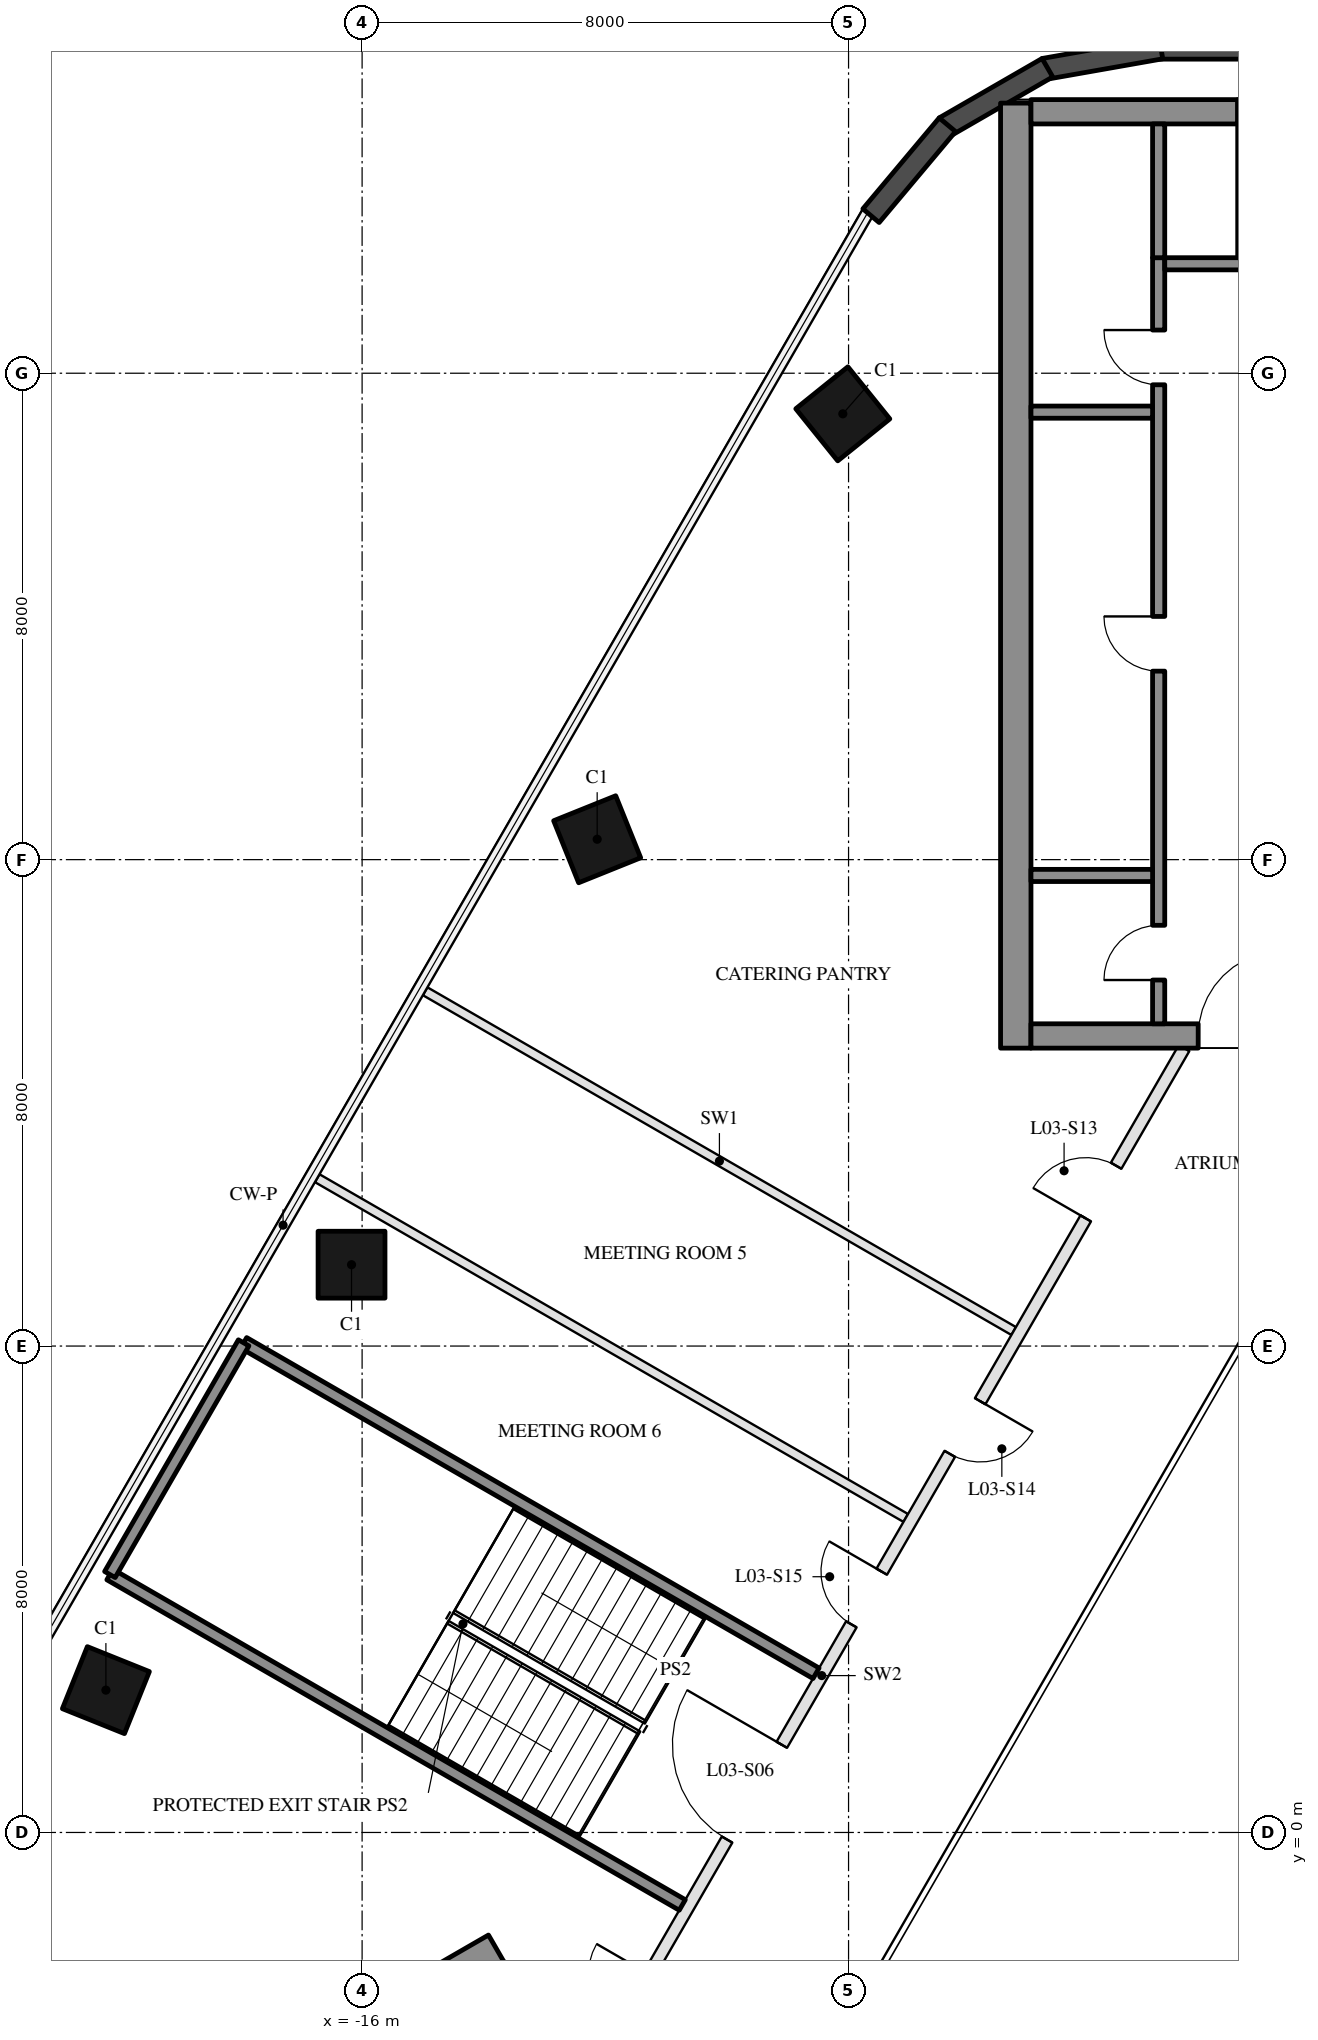
"""IFC4 building model, lengths in metres.
Left out: names, types, materials, properties, quantities, classifications, styles, units other than length and angle.
Written with IfcOpenShell. Run it as: python <this file> out.ifc"""

import sys

from ifc_helpers import new_model, si_unit, direction, frame, frame_2d, origin, origin_2d, place, context, subcontext, project, spatial, rectangle, hollow_rectangle, extrude, boolean, halfspace, element, fill, save


model = new_model("IFC4")
c1 = context("Model", 3, precision=1e-05, world=origin(), true_north=direction((0.0, 1.0)))
c2 = subcontext(c1, "Body", "Model", "MODEL_VIEW")
j1 = project(units=[si_unit("LENGTHUNIT", "METRE"), si_unit("PLANEANGLEUNIT", "RADIAN")], contexts=[c1])
p1 = place(None, origin())
s1 = spatial("IfcSite", under=j1, at=p1, CompositionType="ELEMENT")
p2 = place(p1, origin())
s2 = spatial("IfcBuilding", under=s1, at=p2, CompositionType="ELEMENT")
p3 = place(p2, frame((0.0, 0.0, 23.5)))
s3 = spatial("IfcBuildingStorey", under=s2, at=p3, CompositionType="ELEMENT", Elevation=23.5)
p4 = place(p3, frame((-8.094, 23.332, 0.0), z_axis=(0.024212996995, -0.062505583791, 0.997750862075), x_axis=(0.500357699692, 0.864797842793, 0.042034074978)))
e1 = element("IfcColumn", 1, at=p4, inside=s3, PredefinedType="COLUMN", context=c2, shape_type="SweptSolid", body=[
    boolean("DIFFERENCE", boolean("DIFFERENCE", extrude(hollow_rectangle(XDim=1.1, YDim=1.1, WallThickness=0.05, at=origin_2d()), origin(), (0.0, 0.0, 1.0), 5.011), halfspace(frame((0.0, 0.0, 0.017), z_axis=(0.0, 0.0, 1.0), x_axis=(1.0, 0.0, 0.0)), True)), halfspace(frame((0.0, 0.0, 4.999), z_axis=(0.0, 0.0, 1.0), x_axis=(1.0, 0.0, 0.0)), False)),
])
p5 = place(p3, frame((-12.134, 16.335, 0.0), z_axis=(0.034759119107, -0.04436297109, 0.998410602125), x_axis=(0.500316360293, 0.865586931558, 0.021042897599)))
e2 = element("IfcColumn", 2, at=p5, inside=s3, PredefinedType="COLUMN", context=c2, shape_type="SweptSolid", body=[
    boolean("DIFFERENCE", boolean("DIFFERENCE", extrude(hollow_rectangle(XDim=1.1, YDim=1.1, WallThickness=0.05, at=origin_2d()), origin(), (0.0, 0.0, 1.0), 5.008), halfspace(frame((0.0, 0.0, 0.014), z_axis=(0.0, 0.0, 1.0), x_axis=(1.0, 0.0, 0.0)), True)), halfspace(frame((0.0, 0.0, 4.997), z_axis=(0.0, 0.0, 1.0), x_axis=(1.0, 0.0, 0.0)), False)),
])
p6 = place(p3, frame((-16.174, 9.338, 0.0), z_axis=(0.045250647617, -0.026087388443, 0.99863498189), x_axis=(-0.499528531793, -0.866297435009, 4.558094e-06)))
e3 = element("IfcColumn", 3, at=p6, inside=s3, PredefinedType="COLUMN", context=c2, shape_type="SweptSolid", body=[
    boolean("DIFFERENCE", boolean("DIFFERENCE", extrude(hollow_rectangle(XDim=1.1, YDim=1.1, WallThickness=0.05, at=origin_2d()), origin(), (0.0, 0.0, 1.0), 5.007), halfspace(frame((0.0, 0.0, 0.013), z_axis=(0.0, 0.0, 1.0), x_axis=(1.0, 0.0, 0.0)), True)), halfspace(frame((0.0, 0.0, 4.996), z_axis=(0.0, 0.0, 1.0), x_axis=(1.0, 0.0, 0.0)), False)),
])
p7 = place(p3, frame((-20.214, 2.341, 0.0), z_axis=(0.055770669369, -0.007946345373, 0.998411983118), x_axis=(-0.499656252381, -0.865968742186, 0.021018254285)))
e4 = element("IfcColumn", 4, at=p7, inside=s3, PredefinedType="COLUMN", context=c2, shape_type="SweptSolid", body=[
    boolean("DIFFERENCE", boolean("DIFFERENCE", extrude(hollow_rectangle(XDim=1.1, YDim=1.1, WallThickness=0.05, at=origin_2d()), origin(), (0.0, 0.0, 1.0), 5.008), halfspace(frame((0.0, 0.0, 0.014), z_axis=(0.0, 0.0, 1.0), x_axis=(1.0, 0.0, 0.0)), True)), halfspace(frame((0.0, 0.0, 4.997), z_axis=(0.0, 0.0, 1.0), x_axis=(1.0, 0.0, 0.0)), False)),
])
p8 = place(p3, frame((0.0, 27.2, 0.0), z_axis=(0.0, 0.0, 1.0), x_axis=(1.0, 0.0, 0.0)))
e5 = element("IfcColumn", 5, at=p8, inside=s3, PredefinedType="COLUMN", context=c2, shape_type="SweptSolid", body=[
    extrude(hollow_rectangle(XDim=3.2, YDim=2.6, WallThickness=0.08, at=origin_2d()), origin(), (0.0, 0.0, 1.0), 5.0),
])
p9 = place(p3, frame((2.893, 29.341, 0.0), z_axis=(0.0, 0.0, 1.0), x_axis=(-1.0, 0.0, 0.0)))
e6 = element("IfcWall", 6, at=p9, inside=s3, PredefinedType="SOLIDWALL", context=c2, shape_type="SweptSolid", body=[
    extrude(rectangle(XDim=5.787, YDim=0.35, at=frame_2d((2.893, 0.0))), origin(), (0.0, 0.0, 1.0), 4.7),
])
p10 = place(p3, frame((-2.863, 29.344, 0.0), z_axis=(0.0, 0.0, 1.0), x_axis=(-0.98479990812, -0.173692662389, 0.0)))
e7 = element("IfcWall", 7, at=p10, inside=s3, PredefinedType="SOLIDWALL", context=c2, shape_type="SweptSolid", body=[
    extrude(rectangle(XDim=1.954, YDim=0.35, at=frame_2d((0.977, 0.0))), origin(), (0.0, 0.0, 1.0), 4.7),
])
p11 = place(p3, frame((-4.729, 29.025, 0.0), z_axis=(0.0, 0.0, 1.0), x_axis=(-0.866027425724, -0.499996497882, 0.0)))
e8 = element("IfcWall", 8, at=p11, inside=s3, PredefinedType="SOLIDWALL", context=c2, shape_type="SweptSolid", body=[
    extrude(rectangle(XDim=1.954, YDim=0.35, at=frame_2d((0.977, 0.0))), origin(), (0.0, 0.0, 1.0), 4.7),
])
p12 = place(p3, frame((-6.375, 28.087, 0.0), z_axis=(0.0, 0.0, 1.0), x_axis=(-0.642799224464, -0.766034697013, 0.0)))
e9 = element("IfcWall", 9, at=p12, inside=s3, PredefinedType="SOLIDWALL", context=c2, shape_type="SweptSolid", body=[
    extrude(rectangle(XDim=1.953, YDim=0.35, at=frame_2d((0.977, 0.0))), origin(), (0.0, 0.0, 1.0), 4.7),
])
p13 = place(p3, frame((-5.25, 12.9, 0.0), z_axis=(0.0, 0.0, 1.0), x_axis=(0.0, 1.0, 0.0)))
e10 = element("IfcWall", 10, at=p13, inside=s3, PredefinedType="SHEAR", context=c2, shape_type="SweptSolid", body=[
    extrude(rectangle(XDim=15.542, YDim=0.5, at=frame_2d((7.771, 0.0))), origin(), (0.0, 0.0, 1.0), 4.7),
])
p14 = place(p3, frame((5.0, 13.1, 0.0), z_axis=(0.0, 0.0, 1.0), x_axis=(-1.0, 0.0, 0.0)))
e11 = element("IfcWall", 11, at=p14, inside=s3, PredefinedType="SHEAR", context=c2, shape_type="SweptSolid", body=[
    extrude(rectangle(XDim=10.0, YDim=0.4, at=frame_2d((5.0, 0.0))), origin(), (0.0, 0.0, 1.0), 4.7),
])
p15 = place(p14, frame((3.55, 0.0, 0.0)))
e12 = element("IfcOpeningElement", 12, at=p15, cuts=e11, PredefinedType="OPENING", context=c2, shape_type="SweptSolid", body=[
    extrude(rectangle(XDim=1.1, YDim=2.1, at=frame_2d((0.55, 1.05))), frame((0.0, 0.21, 0.0), z_axis=(0.0, -1.0, 0.0), x_axis=(1.0, 0.0, 0.0)), (0.0, 0.0, 1.0), 0.42),
])
p16 = place(p14, frame((5.85, 0.0, 0.0)))
e13 = element("IfcOpeningElement", 13, at=p16, cuts=e11, PredefinedType="OPENING", context=c2, shape_type="SweptSolid", body=[
    extrude(rectangle(XDim=1.4, YDim=2.1, at=frame_2d((0.7, 1.05))), frame((0.0, 0.21, 0.0), z_axis=(0.0, -1.0, 0.0), x_axis=(1.0, 0.0, 0.0)), (0.0, 0.0, 1.0), 0.42),
])
p17 = place(p3, frame((-1.6, 28.3, 0.0), z_axis=(0.0, 0.0, 1.0), x_axis=(-1.0, 0.0, 0.0)))
e14 = element("IfcWall", 14, at=p17, inside=s3, PredefinedType="SHEAR", context=c2, shape_type="SweptSolid", body=[
    extrude(rectangle(XDim=3.4, YDim=0.4, at=frame_2d((1.7, 0.0))), origin(), (0.0, 0.0, 1.0), 4.7),
])
p18 = place(p3, frame((-2.9, 13.3, 0.0), z_axis=(0.0, 0.0, 1.0), x_axis=(0.0, 1.0, 0.0)))
e15 = element("IfcWall", 15, at=p18, inside=s3, PredefinedType="SHEAR", context=c2, shape_type="SweptSolid", body=[
    extrude(rectangle(XDim=12.6, YDim=0.2, at=frame_2d((6.3, 0.0))), origin(), (0.0, 0.0, 1.0), 4.7),
])
p19 = place(p18, frame((0.72, 0.0, 0.0)))
e16 = element("IfcOpeningElement", 16, at=p19, cuts=e15, PredefinedType="OPENING", context=c2, shape_type="SweptSolid", body=[
    extrude(rectangle(XDim=0.9, YDim=2.1, at=frame_2d((0.45, 1.05))), frame((0.0, 0.11, 0.0), z_axis=(0.0, -1.0, 0.0), x_axis=(1.0, 0.0, 0.0)), (0.0, 0.0, 1.0), 0.22),
])
p20 = place(p18, frame((5.8, 0.0, 0.0)))
e17 = element("IfcOpeningElement", 17, at=p20, cuts=e15, PredefinedType="OPENING", context=c2, shape_type="SweptSolid", body=[
    extrude(rectangle(XDim=0.9, YDim=2.1, at=frame_2d((0.45, 1.05))), frame((0.0, 0.11, 0.0), z_axis=(0.0, -1.0, 0.0), x_axis=(1.0, 0.0, 0.0)), (0.0, 0.0, 1.0), 0.22),
])
p21 = place(p18, frame((10.51, 0.0, 0.0)))
e18 = element("IfcOpeningElement", 18, at=p21, cuts=e15, PredefinedType="OPENING", context=c2, shape_type="SweptSolid", body=[
    extrude(rectangle(XDim=0.9, YDim=2.1, at=frame_2d((0.45, 1.05))), frame((0.0, 0.11, 0.0), z_axis=(0.0, -1.0, 0.0), x_axis=(1.0, 0.0, 0.0)), (0.0, 0.0, 1.0), 0.22),
])
p22 = place(p3, frame((-0.4, 25.8, 0.0), z_axis=(0.0, 0.0, 1.0), x_axis=(-1.0, 0.0, 0.0)))
e19 = element("IfcWall", 19, at=p22, inside=s3, PredefinedType="SHEAR", context=c2, shape_type="SweptSolid", body=[
    extrude(rectangle(XDim=2.4, YDim=0.2, at=frame_2d((1.2, 0.0))), origin(), (0.0, 0.0, 1.0), 4.7),
])
for number, where, z_axis, x_axis in (
    (20, (-3.0, 15.74, 0.0), (0.0, 0.0, 1.0), (-1.0, 0.0, 0.0)),
    (21, (-3.0, 23.36, 0.0), (0.0, 0.0, 1.0), (-1.0, 0.0, 0.0)),
):
    element("IfcWall", number, at=place(p3, frame(where, z_axis=z_axis, x_axis=x_axis)), inside=s3, PredefinedType="SHEAR", context=c2, shape_type="SweptSolid", body=[
        extrude(rectangle(XDim=2.0, YDim=0.2, at=frame_2d((1.0, 0.0))), origin(), (0.0, 0.0, 1.0), 4.7),
    ])
p23 = place(p3, frame((-2.9, 25.9, 0.0), z_axis=(0.0, 0.0, 1.0), x_axis=(0.0, 1.0, 0.0)))
e22 = element("IfcWall", 22, at=p23, inside=s3, PredefinedType="SHEAR", context=c2, shape_type="SweptSolid", body=[
    extrude(rectangle(XDim=2.2, YDim=0.2, at=frame_2d((1.1, 0.0))), origin(), (0.0, 0.0, 1.0), 4.7),
])
p24 = place(p3, frame((-13.797, -1.903, 0.0), z_axis=(0.0, 0.0, 1.0), x_axis=(-0.866025760136, -0.499999382781, 0.0)))
e23 = element("IfcWall", 23, at=p24, inside=s3, PredefinedType="SHEAR", context=c2, shape_type="SweptSolid", body=[
    extrude(rectangle(XDim=15.542, YDim=0.5, at=frame_2d((7.771, 0.0))), origin(), (0.0, 0.0, 1.0), 4.7),
])
for number, where, z_axis, x_axis in (
    (24, (-14.963, 13.835, 0.0), (0.0, 0.0, 1.0), (0.866, -0.5, 0.0)),
    (25, (-16.738, 10.761, 0.0), (0.0, 0.0, 1.0), (0.866, -0.5, 0.0)),
):
    element("IfcWall", number, at=place(p3, frame(where, z_axis=z_axis, x_axis=x_axis)), inside=s3, PredefinedType="PARTITIONING", context=c2, shape_type="SweptSolid", body=[
        extrude(rectangle(XDim=11.176, YDim=0.15, at=frame_2d((5.588, 0.0))), origin(), (0.0, 0.0, 1.0), 4.1),
    ])
p25 = place(p3, frame((-17.948, 8.053, 0.0), z_axis=(0.0, 0.0, 1.0), x_axis=(0.86602026553, -0.500008899612, 0.0)))
e26 = element("IfcWall", 26, at=p25, inside=s3, PredefinedType="SOLIDWALL", context=c2, shape_type="SweptSolid", body=[
    extrude(rectangle(XDim=10.87, YDim=0.2, at=frame_2d((5.435, 0.0))), origin(), (0.0, 0.0, 1.0), 4.7),
])
p26 = place(p3, frame((-20.148, 4.242, 0.0), z_axis=(0.0, 0.0, 1.0), x_axis=(0.866025880615, -0.499999174104, 0.0)))
e27 = element("IfcWall", 27, at=p26, inside=s3, PredefinedType="SOLIDWALL", context=c2, shape_type="SweptSolid", body=[
    extrude(rectangle(XDim=10.87, YDim=0.2, at=frame_2d((5.435, 0.0))), origin(), (0.0, 0.0, 1.0), 4.7),
])
p27 = place(p3, frame((-2.482, 12.9, 0.0), z_axis=(0.0, 0.0, 1.0), x_axis=(-0.50000478328, -0.866022642139, 0.0)))
e28 = element("IfcWall", 28, at=p27, inside=s3, PredefinedType="PARTITIONING", context=c2, shape_type="SweptSolid", body=[
    extrude(rectangle(XDim=19.861, YDim=0.2, at=frame_2d((9.931, 0.0))), origin(), (0.0, 0.0, 1.0), 3.91),
])
p28 = place(p27, frame((13.23, 0.0, 0.0)))
e29 = element("IfcOpeningElement", 29, at=p28, cuts=e28, PredefinedType="OPENING", context=c2, shape_type="SweptSolid", body=[
    extrude(rectangle(XDim=1.8, YDim=2.1, at=frame_2d((0.9, 1.05))), frame((0.0, 0.11, 0.0), z_axis=(0.0, -1.0, 0.0), x_axis=(1.0, 0.0, 0.0)), (0.0, 0.0, 1.0), 0.22),
])
p29 = place(p27, frame((2.234, 0.0, 0.0)))
e30 = element("IfcOpeningElement", 30, at=p29, cuts=e28, PredefinedType="OPENING", context=c2, shape_type="SweptSolid", body=[
    extrude(rectangle(XDim=1.0, YDim=2.1, at=frame_2d((0.5, 1.05))), frame((0.0, 0.11, 0.0), z_axis=(0.0, -1.0, 0.0), x_axis=(1.0, 0.0, 0.0)), (0.0, 0.0, 1.0), 0.22),
])
p30 = place(p27, frame((6.706, 0.0, 0.0)))
e31 = element("IfcOpeningElement", 31, at=p30, cuts=e28, PredefinedType="OPENING", context=c2, shape_type="SweptSolid", body=[
    extrude(rectangle(XDim=1.0, YDim=2.1, at=frame_2d((0.5, 1.05))), frame((0.0, 0.11, 0.0), z_axis=(0.0, -1.0, 0.0), x_axis=(1.0, 0.0, 0.0)), (0.0, 0.0, 1.0), 0.22),
])
p31 = place(p27, frame((9.943, 0.0, 0.0)))
e32 = element("IfcOpeningElement", 32, at=p31, cuts=e28, PredefinedType="OPENING", context=c2, shape_type="SweptSolid", body=[
    extrude(rectangle(XDim=1.0, YDim=2.1, at=frame_2d((0.5, 1.05))), frame((0.0, 0.11, 0.0), z_axis=(0.0, -1.0, 0.0), x_axis=(1.0, 0.0, 0.0)), (0.0, 0.0, 1.0), 0.22),
])
p32 = place(p27, frame((17.59, 0.0, 0.0)))
e33 = element("IfcOpeningElement", 33, at=p32, cuts=e28, PredefinedType="OPENING", context=c2, shape_type="SweptSolid", body=[
    extrude(rectangle(XDim=1.0, YDim=2.1, at=frame_2d((0.5, 1.05))), frame((0.0, 0.11, 0.0), z_axis=(0.0, -1.0, 0.0), x_axis=(1.0, 0.0, 0.0)), (0.0, 0.0, 1.0), 0.22),
])
p33 = place(p3, frame((-17.948, 8.053, 0.0), z_axis=(0.0, 0.0, 1.0), x_axis=(-0.50002983664, -0.866008176907, 0.0)))
e34 = element("IfcWall", 34, at=p33, inside=s3, PredefinedType="SOLIDWALL", context=c2, shape_type="SweptSolid", body=[
    extrude(rectangle(XDim=4.4, YDim=0.2, at=frame_2d((2.2, 0.0))), origin(), (0.0, 0.0, 1.0), 4.7),
])
p34 = place(p19, origin())
e35 = element("IfcDoor", 35, at=p34, inside=s3, OperationType="SINGLE_SWING_LEFT", PredefinedType="DOOR", context=c2, shape_type="SweptSolid", body=[
    extrude(rectangle(XDim=0.9, YDim=2.1, at=frame_2d((0.45, 1.05))), frame((0.0, 0.025, 0.0), z_axis=(0.0, -1.0, 0.0), x_axis=(1.0, 0.0, 0.0)), (0.0, 0.0, 1.0), 0.05),
])
fill(e16, e35)
p35 = place(p20, origin())
e36 = element("IfcDoor", 36, at=p35, inside=s3, OperationType="SINGLE_SWING_RIGHT", PredefinedType="DOOR", context=c2, shape_type="SweptSolid", body=[
    extrude(rectangle(XDim=0.9, YDim=2.1, at=frame_2d((0.45, 1.05))), frame((0.0, 0.025, 0.0), z_axis=(0.0, -1.0, 0.0), x_axis=(1.0, 0.0, 0.0)), (0.0, 0.0, 1.0), 0.05),
])
fill(e17, e36)
p36 = place(p21, origin())
e37 = element("IfcDoor", 37, at=p36, inside=s3, OperationType="SINGLE_SWING_RIGHT", PredefinedType="DOOR", context=c2, shape_type="SweptSolid", body=[
    extrude(rectangle(XDim=0.9, YDim=2.1, at=frame_2d((0.45, 1.05))), frame((0.0, 0.025, 0.0), z_axis=(0.0, -1.0, 0.0), x_axis=(1.0, 0.0, 0.0)), (0.0, 0.0, 1.0), 0.05),
])
fill(e18, e37)
p37 = place(p16, frame((1.4, 0.0, 0.0), z_axis=(0.0, 0.0, 1.0), x_axis=(-1.0, 0.0, 0.0)))
e38 = element("IfcDoor", 38, at=p37, inside=s3, OperationType="DOUBLE_DOOR_SINGLE_SWING", PredefinedType="DOOR", context=c2, shape_type="SweptSolid", body=[
    extrude(rectangle(XDim=1.4, YDim=2.1, at=frame_2d((0.7, 1.05))), frame((0.0, 0.025, 0.0), z_axis=(0.0, -1.0, 0.0), x_axis=(1.0, 0.0, 0.0)), (0.0, 0.0, 1.0), 0.05),
])
fill(e13, e38)
p38 = place(p28, frame((1.8, 0.0, 0.0), z_axis=(0.0, 0.0, 1.0), x_axis=(-1.0, 0.0, 0.0)))
e39 = element("IfcDoor", 39, at=p38, inside=s3, OperationType="DOUBLE_DOOR_SINGLE_SWING", PredefinedType="DOOR", context=c2, shape_type="SweptSolid", body=[
    extrude(rectangle(XDim=1.8, YDim=2.1, at=frame_2d((0.9, 1.05))), frame((0.0, 0.025, 0.0), z_axis=(0.0, -1.0, 0.0), x_axis=(1.0, 0.0, 0.0)), (0.0, 0.0, 1.0), 0.05),
])
fill(e29, e39)
p39 = place(p29, frame((1.0, 0.0, 0.0), z_axis=(0.0, 0.0, 1.0), x_axis=(-1.0, 0.0, 0.0)))
e40 = element("IfcDoor", 40, at=p39, inside=s3, OperationType="SINGLE_SWING_LEFT", PredefinedType="DOOR", context=c2, shape_type="SweptSolid", body=[
    extrude(rectangle(XDim=1.0, YDim=2.1, at=frame_2d((0.5, 1.05))), frame((0.0, 0.025, 0.0), z_axis=(0.0, -1.0, 0.0), x_axis=(1.0, 0.0, 0.0)), (0.0, 0.0, 1.0), 0.05),
])
fill(e30, e40)
p40 = place(p30, origin())
e41 = element("IfcDoor", 41, at=p40, inside=s3, OperationType="SINGLE_SWING_LEFT", PredefinedType="DOOR", context=c2, shape_type="SweptSolid", body=[
    extrude(rectangle(XDim=1.0, YDim=2.1, at=frame_2d((0.5, 1.05))), frame((0.0, 0.025, 0.0), z_axis=(0.0, -1.0, 0.0), x_axis=(1.0, 0.0, 0.0)), (0.0, 0.0, 1.0), 0.05),
])
fill(e31, e41)
p41 = place(p31, frame((1.0, 0.0, 0.0), z_axis=(0.0, 0.0, 1.0), x_axis=(-1.0, 0.0, 0.0)))
e42 = element("IfcDoor", 42, at=p41, inside=s3, OperationType="SINGLE_SWING_RIGHT", PredefinedType="DOOR", context=c2, shape_type="SweptSolid", body=[
    extrude(rectangle(XDim=1.0, YDim=2.1, at=frame_2d((0.5, 1.05))), frame((0.0, 0.025, 0.0), z_axis=(0.0, -1.0, 0.0), x_axis=(1.0, 0.0, 0.0)), (0.0, 0.0, 1.0), 0.05),
])
fill(e32, e42)
save(model, sys.argv[1])
